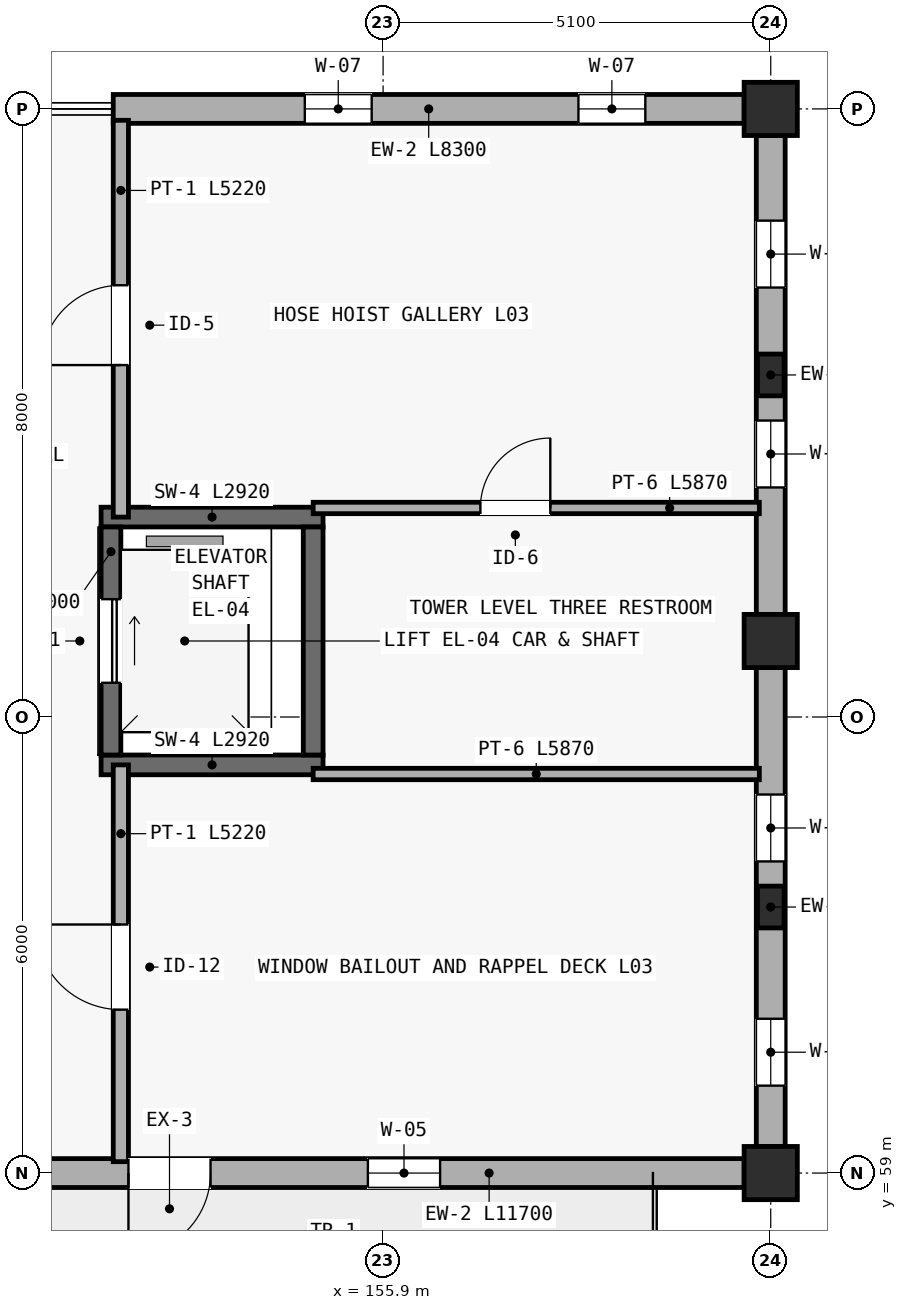
"""IFC4 building model, lengths in metres.
Left out: names, types, materials, properties, quantities, classifications, styles, units other than length and angle.
Written with IfcOpenShell. Run it as: python <this file> out.ifc"""

import sys

from ifc_helpers import new_model, si_unit, direction, frame, frame_2d, origin, origin_2d, place, context, subcontext, project, spatial, rectangle, extrude, element, fill, save


model = new_model("IFC4")
c1 = context("Model", 3, precision=1e-05, world=origin(), true_north=direction((0.0, 1.0)))
c2 = subcontext(c1, "Body", "Model", "MODEL_VIEW")
j1 = project(units=[si_unit("LENGTHUNIT", "METRE"), si_unit("PLANEANGLEUNIT", "RADIAN")], contexts=[c1])
p1 = place(None, origin())
s1 = spatial("IfcSite", under=j1, at=p1, CompositionType="ELEMENT")
p2 = place(p1, origin())
s2 = spatial("IfcBuilding", under=s1, at=p2, CompositionType="ELEMENT")
p3 = place(p2, frame((0.0, 0.0, 9.3)))
s3 = spatial("IfcBuildingStorey", under=s2, at=p3, CompositionType="ELEMENT", Elevation=9.3)
for number, where, z_axis, x_axis in (
    (1, (161.0, 59.0, 0.0), (0.0, 0.0, 1.0), (1.0, 0.0, 0.0)),
    (2, (161.0, 66.0, 0.0), (0.0, 0.0, 1.0), (1.0, 0.0, 0.0)),
    (3, (161.0, 73.0, 0.0), (0.0, 0.0, 1.0), (1.0, 0.0, 0.0)),
):
    element("IfcColumn", number, at=place(p3, frame(where, z_axis=z_axis, x_axis=x_axis)), inside=s3, PredefinedType="COLUMN", context=c2, shape_type="SweptSolid", body=[
        extrude(rectangle(XDim=0.7, YDim=0.7, at=origin_2d()), origin(), (0.0, 0.0, 1.0), 3.45),
    ])
for number, where, z_axis, x_axis in (
    (4, (161.0, 62.5, 0.0), (0.0, 0.0, 1.0), (1.0, 0.0, 0.0)),
    (5, (161.0, 69.5, 0.0), (0.0, 0.0, 1.0), (1.0, 0.0, 0.0)),
):
    element("IfcColumn", number, at=place(p3, frame(where, z_axis=z_axis, x_axis=x_axis)), inside=s3, PredefinedType="PILASTER", context=c2, shape_type="SweptSolid", body=[
        extrude(rectangle(XDim=0.35, YDim=0.55, at=origin_2d()), origin(), (0.0, 0.0, 1.0), 3.45),
    ])
p4 = place(p3, frame((148.95, 59.0, 0.0), z_axis=(0.0, 0.0, 1.0), x_axis=(1.0, 0.0, 0.0)))
e6 = element("IfcWall", 6, at=p4, inside=s3, PredefinedType="STANDARD", context=c2, shape_type="SweptSolid", body=[
    extrude(rectangle(XDim=11.7, YDim=0.38, at=frame_2d((5.85, 0.0))), origin(), (0.0, 0.0, 1.0), 2.75),
])
p5 = place(p4, frame((3.6, 0.0, 0.0)))
e7 = element("IfcOpeningElement", 7, at=p5, cuts=e6, PredefinedType="OPENING", context=c2, shape_type="SweptSolid", body=[
    extrude(rectangle(XDim=1.08, YDim=2.1, at=frame_2d((0.54, 1.05))), frame((0.0, 0.2, 0.0), z_axis=(0.0, -1.0, 0.0), x_axis=(1.0, 0.0, 0.0)), (0.0, 0.0, 1.0), 0.4),
])
p6 = place(p4, frame((1.15, 0.0, 0.75)))
e8 = element("IfcOpeningElement", 8, at=p6, cuts=e6, PredefinedType="OPENING", context=c2, shape_type="SweptSolid", body=[
    extrude(rectangle(XDim=0.95, YDim=1.35, at=frame_2d((0.475, 0.675))), frame((0.0, 0.2, 0.0), z_axis=(0.0, -1.0, 0.0), x_axis=(1.0, 0.0, 0.0)), (0.0, 0.0, 1.0), 0.4),
])
p7 = place(p4, frame((6.75, 0.0, 0.75)))
e9 = element("IfcOpeningElement", 9, at=p7, cuts=e6, PredefinedType="OPENING", context=c2, shape_type="SweptSolid", body=[
    extrude(rectangle(XDim=0.95, YDim=1.35, at=frame_2d((0.475, 0.675))), frame((0.0, 0.2, 0.0), z_axis=(0.0, -1.0, 0.0), x_axis=(1.0, 0.0, 0.0)), (0.0, 0.0, 1.0), 0.4),
])
p8 = place(p3, frame((160.65, 73.0, 0.0), z_axis=(0.0, 0.0, 1.0), x_axis=(-1.0, 0.0, 0.0)))
e10 = element("IfcWall", 10, at=p8, inside=s3, PredefinedType="STANDARD", context=c2, shape_type="SweptSolid", body=[
    extrude(rectangle(XDim=8.3, YDim=0.38, at=frame_2d((4.15, 0.0))), origin(), (0.0, 0.0, 1.0), 2.75),
])
p9 = place(p8, frame((1.3, 0.0, 0.75)))
e11 = element("IfcOpeningElement", 11, at=p9, cuts=e10, PredefinedType="OPENING", context=c2, shape_type="SweptSolid", body=[
    extrude(rectangle(XDim=0.88, YDim=1.5, at=frame_2d((0.44, 0.75))), frame((0.0, 0.2, 0.0), z_axis=(0.0, -1.0, 0.0), x_axis=(1.0, 0.0, 0.0)), (0.0, 0.0, 1.0), 0.4),
])
p10 = place(p8, frame((4.9, 0.0, 0.75)))
e12 = element("IfcOpeningElement", 12, at=p10, cuts=e10, PredefinedType="OPENING", context=c2, shape_type="SweptSolid", body=[
    extrude(rectangle(XDim=0.88, YDim=1.5, at=frame_2d((0.44, 0.75))), frame((0.0, 0.2, 0.0), z_axis=(0.0, -1.0, 0.0), x_axis=(1.0, 0.0, 0.0)), (0.0, 0.0, 1.0), 0.4),
])
p11 = place(p3, frame((161.0, 59.35, 0.0), z_axis=(0.0, 0.0, 1.0), x_axis=(0.0, 1.0, 0.0)))
e13 = element("IfcWall", 13, at=p11, inside=s3, PredefinedType="STANDARD", context=c2, shape_type="SweptSolid", body=[
    extrude(rectangle(XDim=6.3, YDim=0.38, at=frame_2d((3.15, 0.0))), origin(), (0.0, 0.0, 1.0), 2.75),
])
p12 = place(p11, frame((0.8, 0.0, 0.75)))
e14 = element("IfcOpeningElement", 14, at=p12, cuts=e13, PredefinedType="OPENING", context=c2, shape_type="SweptSolid", body=[
    extrude(rectangle(XDim=0.88, YDim=1.5, at=frame_2d((0.44, 0.75))), frame((0.0, 0.2, 0.0), z_axis=(0.0, -1.0, 0.0), x_axis=(1.0, 0.0, 0.0)), (0.0, 0.0, 1.0), 0.4),
])
p13 = place(p11, frame((3.75, 0.0, 0.75)))
e15 = element("IfcOpeningElement", 15, at=p13, cuts=e13, PredefinedType="OPENING", context=c2, shape_type="SweptSolid", body=[
    extrude(rectangle(XDim=0.88, YDim=1.5, at=frame_2d((0.44, 0.75))), frame((0.0, 0.2, 0.0), z_axis=(0.0, -1.0, 0.0), x_axis=(1.0, 0.0, 0.0)), (0.0, 0.0, 1.0), 0.4),
])
p14 = place(p3, frame((161.0, 66.35, 0.0), z_axis=(0.0, 0.0, 1.0), x_axis=(0.0, 1.0, 0.0)))
e16 = element("IfcWall", 16, at=p14, inside=s3, PredefinedType="STANDARD", context=c2, shape_type="SweptSolid", body=[
    extrude(rectangle(XDim=6.3, YDim=0.38, at=frame_2d((3.15, 0.0))), origin(), (0.0, 0.0, 1.0), 2.75),
])
p15 = place(p14, frame((1.67, 0.0, 0.75)))
e17 = element("IfcOpeningElement", 17, at=p15, cuts=e16, PredefinedType="OPENING", context=c2, shape_type="SweptSolid", body=[
    extrude(rectangle(XDim=0.88, YDim=1.5, at=frame_2d((0.44, 0.75))), frame((0.0, 0.2, 0.0), z_axis=(0.0, -1.0, 0.0), x_axis=(1.0, 0.0, 0.0)), (0.0, 0.0, 1.0), 0.4),
])
p16 = place(p14, frame((4.3, 0.0, 0.75)))
e18 = element("IfcOpeningElement", 18, at=p16, cuts=e16, PredefinedType="OPENING", context=c2, shape_type="SweptSolid", body=[
    extrude(rectangle(XDim=0.88, YDim=1.5, at=frame_2d((0.44, 0.75))), frame((0.0, 0.2, 0.0), z_axis=(0.0, -1.0, 0.0), x_axis=(1.0, 0.0, 0.0)), (0.0, 0.0, 1.0), 0.4),
])
for number, where, z_axis, x_axis in (
    (19, (152.19, 64.37, 0.0), (0.0, 0.0, 1.0), (1.0, 0.0, 0.0)),
    (20, (155.11, 67.63, 0.0), (0.0, 0.0, 1.0), (-1.0, 0.0, 0.0)),
):
    element("IfcWall", number, at=place(p3, frame(where, z_axis=z_axis, x_axis=x_axis)), inside=s3, PredefinedType="SHEAR", context=c2, shape_type="SweptSolid", body=[
        extrude(rectangle(XDim=2.92, YDim=0.26, at=frame_2d((1.46, 0.0))), origin(), (0.0, 0.0, 1.0), 3.2),
    ])
p17 = place(p3, frame((152.32, 67.5, 0.0), z_axis=(0.0, 0.0, 1.0), x_axis=(0.0, -1.0, 0.0)))
e21 = element("IfcWall", 21, at=p17, inside=s3, PredefinedType="SHEAR", context=c2, shape_type="SweptSolid", body=[
    extrude(rectangle(XDim=3.0, YDim=0.26, at=frame_2d((1.5, 0.0))), origin(), (0.0, 0.0, 1.0), 3.2),
])
p18 = place(p17, frame((0.95, 0.0, 0.0)))
e22 = element("IfcOpeningElement", 22, at=p18, cuts=e21, PredefinedType="OPENING", context=c2, shape_type="SweptSolid", body=[
    extrude(rectangle(XDim=1.1, YDim=2.15, at=frame_2d((0.55, 1.075))), frame((0.0, 0.14, 0.0), z_axis=(0.0, -1.0, 0.0), x_axis=(1.0, 0.0, 0.0)), (0.0, 0.0, 1.0), 0.28),
])
p19 = place(p3, frame((154.98, 64.5, 0.0), z_axis=(0.0, 0.0, 1.0), x_axis=(0.0, 1.0, 0.0)))
e23 = element("IfcWall", 23, at=p19, inside=s3, PredefinedType="SHEAR", context=c2, shape_type="SweptSolid", body=[
    extrude(rectangle(XDim=3.0, YDim=0.26, at=frame_2d((1.5, 0.0))), origin(), (0.0, 0.0, 1.0), 3.2),
])
p20 = place(p3, frame((152.45, 59.15, 0.0), z_axis=(0.0, 0.0, 1.0), x_axis=(0.0, 1.0, 0.0)))
e24 = element("IfcWall", 24, at=p20, inside=s3, PredefinedType="PARTITIONING", context=c2, shape_type="SweptSolid", body=[
    extrude(rectangle(XDim=5.22, YDim=0.2, at=frame_2d((2.61, 0.0))), origin(), (0.0, 0.0, 1.0), 2.7),
])
p21 = place(p20, frame((2.0, 0.0, 0.0)))
e25 = element("IfcOpeningElement", 25, at=p21, cuts=e24, PredefinedType="OPENING", context=c2, shape_type="SweptSolid", body=[
    extrude(rectangle(XDim=1.12, YDim=2.15, at=frame_2d((0.56, 1.075))), frame((0.0, 0.11, 0.0), z_axis=(0.0, -1.0, 0.0), x_axis=(1.0, 0.0, 0.0)), (0.0, 0.0, 1.0), 0.22),
])
p22 = place(p3, frame((152.45, 67.63, 0.0), z_axis=(0.0, 0.0, 1.0), x_axis=(0.0, 1.0, 0.0)))
e26 = element("IfcWall", 26, at=p22, inside=s3, PredefinedType="PARTITIONING", context=c2, shape_type="SweptSolid", body=[
    extrude(rectangle(XDim=5.22, YDim=0.2, at=frame_2d((2.61, 0.0))), origin(), (0.0, 0.0, 1.0), 2.7),
])
p23 = place(p22, frame((2.0, 0.0, 0.0)))
e27 = element("IfcOpeningElement", 27, at=p23, cuts=e26, PredefinedType="OPENING", context=c2, shape_type="SweptSolid", body=[
    extrude(rectangle(XDim=1.05, YDim=2.14, at=frame_2d((0.525, 1.07))), frame((0.0, 0.11, 0.0), z_axis=(0.0, -1.0, 0.0), x_axis=(1.0, 0.0, 0.0)), (0.0, 0.0, 1.0), 0.22),
])
p24 = place(p3, frame((154.98, 64.25, 0.0), z_axis=(0.0, 0.0, 1.0), x_axis=(1.0, 0.0, 0.0)))
e28 = element("IfcWall", 28, at=p24, inside=s3, PredefinedType="PARTITIONING", context=c2, shape_type="SweptSolid", body=[
    extrude(rectangle(XDim=5.87, YDim=0.15, at=frame_2d((2.935, 0.0))), origin(), (0.0, 0.0, 1.0), 2.7),
])
p25 = place(p3, frame((154.98, 67.75, 0.0), z_axis=(0.0, 0.0, 1.0), x_axis=(1.0, 0.0, 0.0)))
e29 = element("IfcWall", 29, at=p25, inside=s3, PredefinedType="PARTITIONING", context=c2, shape_type="SweptSolid", body=[
    extrude(rectangle(XDim=5.87, YDim=0.15, at=frame_2d((2.935, 0.0))), origin(), (0.0, 0.0, 1.0), 2.7),
])
p26 = place(p25, frame((2.2, 0.0, 0.0)))
e30 = element("IfcOpeningElement", 30, at=p26, cuts=e29, PredefinedType="OPENING", context=c2, shape_type="SweptSolid", body=[
    extrude(rectangle(XDim=0.92, YDim=2.1, at=frame_2d((0.46, 1.05))), frame((0.0, 0.085, 0.0), z_axis=(0.0, -1.0, 0.0), x_axis=(1.0, 0.0, 0.0)), (0.0, 0.0, 1.0), 0.17),
])
p27 = place(p5, frame((1.08, 0.0, 0.0), z_axis=(0.0, 0.0, 1.0), x_axis=(-1.0, 0.0, 0.0)))
e31 = element("IfcDoor", 31, at=p27, inside=s3, OperationType="SINGLE_SWING_LEFT", PredefinedType="DOOR", context=c2, shape_type="SweptSolid", body=[
    extrude(rectangle(XDim=1.08, YDim=2.1, at=frame_2d((0.54, 1.05))), frame((0.0, 0.025, 0.0), z_axis=(0.0, -1.0, 0.0), x_axis=(1.0, 0.0, 0.0)), (0.0, 0.0, 1.0), 0.05),
])
fill(e7, e31)
p28 = place(p7, origin())
e32 = element("IfcWindow", 32, at=p28, inside=s3, PartitioningType="SINGLE_PANEL", PredefinedType="WINDOW", context=c2, shape_type="SweptSolid", body=[
    extrude(rectangle(XDim=0.95, YDim=1.35, at=frame_2d((0.475, 0.675))), frame((0.0, 0.03, 0.0), z_axis=(0.0, -1.0, 0.0), x_axis=(1.0, 0.0, 0.0)), (0.0, 0.0, 1.0), 0.06),
])
fill(e9, e32)
p29 = place(p9, origin())
e33 = element("IfcWindow", 33, at=p29, inside=s3, PartitioningType="SINGLE_PANEL", PredefinedType="WINDOW", context=c2, shape_type="SweptSolid", body=[
    extrude(rectangle(XDim=0.88, YDim=1.5, at=frame_2d((0.44, 0.75))), frame((0.0, 0.03, 0.0), z_axis=(0.0, -1.0, 0.0), x_axis=(1.0, 0.0, 0.0)), (0.0, 0.0, 1.0), 0.06),
])
fill(e11, e33)
p30 = place(p10, origin())
e34 = element("IfcWindow", 34, at=p30, inside=s3, PartitioningType="SINGLE_PANEL", PredefinedType="WINDOW", context=c2, shape_type="SweptSolid", body=[
    extrude(rectangle(XDim=0.88, YDim=1.5, at=frame_2d((0.44, 0.75))), frame((0.0, 0.03, 0.0), z_axis=(0.0, -1.0, 0.0), x_axis=(1.0, 0.0, 0.0)), (0.0, 0.0, 1.0), 0.06),
])
fill(e12, e34)
p31 = place(p12, origin())
e35 = element("IfcWindow", 35, at=p31, inside=s3, PartitioningType="SINGLE_PANEL", PredefinedType="WINDOW", context=c2, shape_type="SweptSolid", body=[
    extrude(rectangle(XDim=0.88, YDim=1.5, at=frame_2d((0.44, 0.75))), frame((0.0, 0.03, 0.0), z_axis=(0.0, -1.0, 0.0), x_axis=(1.0, 0.0, 0.0)), (0.0, 0.0, 1.0), 0.06),
])
fill(e14, e35)
p32 = place(p13, origin())
e36 = element("IfcWindow", 36, at=p32, inside=s3, PartitioningType="SINGLE_PANEL", PredefinedType="WINDOW", context=c2, shape_type="SweptSolid", body=[
    extrude(rectangle(XDim=0.88, YDim=1.5, at=frame_2d((0.44, 0.75))), frame((0.0, 0.03, 0.0), z_axis=(0.0, -1.0, 0.0), x_axis=(1.0, 0.0, 0.0)), (0.0, 0.0, 1.0), 0.06),
])
fill(e15, e36)
p33 = place(p15, origin())
e37 = element("IfcWindow", 37, at=p33, inside=s3, PartitioningType="SINGLE_PANEL", PredefinedType="WINDOW", context=c2, shape_type="SweptSolid", body=[
    extrude(rectangle(XDim=0.88, YDim=1.5, at=frame_2d((0.44, 0.75))), frame((0.0, 0.03, 0.0), z_axis=(0.0, -1.0, 0.0), x_axis=(1.0, 0.0, 0.0)), (0.0, 0.0, 1.0), 0.06),
])
fill(e17, e37)
p34 = place(p16, origin())
e38 = element("IfcWindow", 38, at=p34, inside=s3, PartitioningType="SINGLE_PANEL", PredefinedType="WINDOW", context=c2, shape_type="SweptSolid", body=[
    extrude(rectangle(XDim=0.88, YDim=1.5, at=frame_2d((0.44, 0.75))), frame((0.0, 0.03, 0.0), z_axis=(0.0, -1.0, 0.0), x_axis=(1.0, 0.0, 0.0)), (0.0, 0.0, 1.0), 0.06),
])
fill(e18, e38)
p35 = place(p18, origin())
e39 = element("IfcDoor", 39, at=p35, inside=s3, OperationType="SLIDING_TO_LEFT", PredefinedType="DOOR", context=c2, shape_type="SweptSolid", body=[
    extrude(rectangle(XDim=1.1, YDim=2.15, at=frame_2d((0.55, 1.075))), frame((0.0, 0.025, 0.0), z_axis=(0.0, -1.0, 0.0), x_axis=(1.0, 0.0, 0.0)), (0.0, 0.0, 1.0), 0.05),
])
fill(e22, e39)
p36 = place(p21, origin())
e40 = element("IfcDoor", 40, at=p36, inside=s3, OperationType="SINGLE_SWING_RIGHT", PredefinedType="DOOR", context=c2, shape_type="SweptSolid", body=[
    extrude(rectangle(XDim=1.12, YDim=2.15, at=frame_2d((0.56, 1.075))), frame((0.0, 0.025, 0.0), z_axis=(0.0, -1.0, 0.0), x_axis=(1.0, 0.0, 0.0)), (0.0, 0.0, 1.0), 0.05),
])
fill(e25, e40)
p37 = place(p23, origin())
e41 = element("IfcDoor", 41, at=p37, inside=s3, OperationType="SINGLE_SWING_LEFT", PredefinedType="DOOR", context=c2, shape_type="SweptSolid", body=[
    extrude(rectangle(XDim=1.05, YDim=2.14, at=frame_2d((0.525, 1.07))), frame((0.0, 0.025, 0.0), z_axis=(0.0, -1.0, 0.0), x_axis=(1.0, 0.0, 0.0)), (0.0, 0.0, 1.0), 0.05),
])
fill(e27, e41)
p38 = place(p26, origin())
e42 = element("IfcDoor", 42, at=p38, inside=s3, OperationType="SINGLE_SWING_RIGHT", PredefinedType="DOOR", context=c2, shape_type="SweptSolid", body=[
    extrude(rectangle(XDim=0.92, YDim=2.1, at=frame_2d((0.46, 1.05))), frame((0.0, 0.025, 0.0), z_axis=(0.0, -1.0, 0.0), x_axis=(1.0, 0.0, 0.0)), (0.0, 0.0, 1.0), 0.05),
])
fill(e30, e42)
save(model, sys.argv[1])
